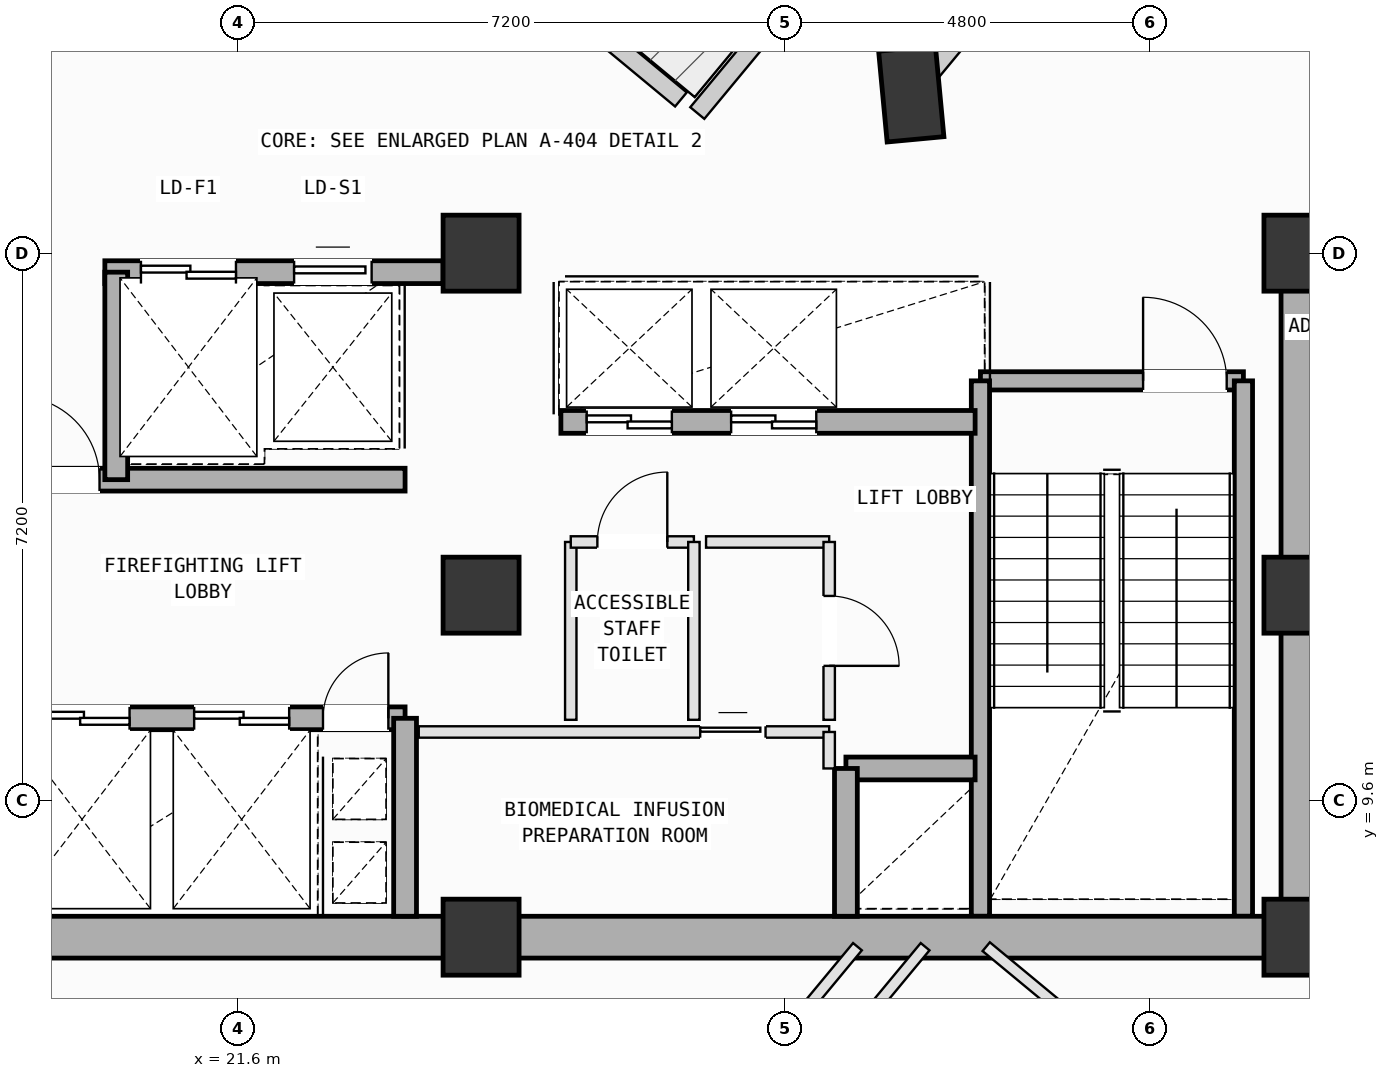
"""IFC4 building model, lengths in metres.
Left out: names, types, materials, properties, quantities, classifications, styles, units other than length and angle.
Written with IfcOpenShell. Run it as: python <this file> out.ifc"""

import sys

from ifc_helpers import new_model, si_unit, direction, frame, frame_2d, origin, origin_2d, place, context, subcontext, project, spatial, rectangle, extrude, element, fill, save


model = new_model("IFC4")
c1 = context("Model", 3, precision=1e-05, world=origin(), true_north=direction((0.0, 1.0)))
c2 = subcontext(c1, "Body", "Model", "MODEL_VIEW")
j1 = project(units=[si_unit("LENGTHUNIT", "METRE"), si_unit("PLANEANGLEUNIT", "RADIAN")], contexts=[c1])
p1 = place(None, origin())
s1 = spatial("IfcSite", under=j1, at=p1, CompositionType="ELEMENT")
p2 = place(p1, origin())
s2 = spatial("IfcBuilding", under=s1, at=p2, CompositionType="ELEMENT")
p3 = place(p2, frame((0.0, 0.0, 239.2)))
s3 = spatial("IfcBuildingStorey", under=s2, at=p3, CompositionType="ELEMENT", Elevation=239.2)
for number, where, z_axis, x_axis in (
    (1, (24.8, 7.8, 0.0), (0.0, 0.0, 1.0), (1.0, 0.0, 0.0)),
    (2, (24.8, 12.3, 0.0), (0.0, 0.0, 1.0), (1.0, 0.0, 0.0)),
    (3, (24.8, 16.8, 0.0), (0.0, 0.0, 1.0), (1.0, 0.0, 0.0)),
    (4, (35.6, 7.8, 0.0), (0.0, 0.0, 1.0), (1.0, 0.0, 0.0)),
    (5, (35.6, 12.3, 0.0), (0.0, 0.0, 1.0), (1.0, 0.0, 0.0)),
    (6, (35.6, 16.8, 0.0), (0.0, 0.0, 1.0), (1.0, 0.0, 0.0)),
):
    element("IfcColumn", number, at=place(p3, frame(where, z_axis=z_axis, x_axis=x_axis)), inside=s3, PredefinedType="COLUMN", context=c2, shape_type="SweptSolid", body=[
        extrude(rectangle(XDim=1.0, YDim=1.0, at=origin_2d()), origin(), (0.0, 0.0, 1.0), 4.0),
    ])
p4 = place(p3, frame((30.46, 18.895, 0.002), z_axis=(0.024549214527, -0.012763148846, 0.99961714576), x_axis=(-0.926059407811, 0.376370916509, 0.027548256063)))
e7 = element("IfcColumn", 7, at=p4, inside=s3, PredefinedType="COLUMN", context=c2, shape_type="SweptSolid", body=[
    extrude(rectangle(XDim=1.2, YDim=0.75, at=origin_2d()), origin(), (0.0, 0.0, 1.0), 3.998),
])
p5 = place(p3, frame((22.07, 23.264, 0.0), z_axis=(0.0, 0.0, 1.0), x_axis=(0.769955085711, -0.638098084928, 0.0)))
e8 = element("IfcWall", 8, at=p5, inside=s3, PredefinedType="SOLIDWALL", context=c2, shape_type="SweptSolid", body=[
    extrude(rectangle(XDim=6.96, YDim=0.24, at=frame_2d((3.48, 0.0))), origin(), (0.0, 0.0, 1.0), 3.265),
])
p6 = place(p5, frame((3.375, 0.0, 0.0)))
e9 = element("IfcOpeningElement", 9, at=p6, cuts=e8, PredefinedType="OPENING", context=c2, shape_type="SweptSolid", body=[
    extrude(rectangle(XDim=1.1, YDim=2.15, at=frame_2d((0.55, 1.075))), frame((0.0, 0.13, 0.0), z_axis=(0.0, -1.0, 0.0), x_axis=(1.0, 0.0, 0.0)), (0.0, 0.0, 1.0), 0.26),
])
p7 = place(p3, frame((27.645, 18.644, 0.0), z_axis=(0.0, 0.0, 1.0), x_axis=(0.638107200467, 0.769947531142, 0.0)))
e10 = element("IfcWall", 10, at=p7, inside=s3, PredefinedType="SOLIDWALL", context=c2, shape_type="SweptSolid", body=[
    extrude(rectangle(XDim=2.5, YDim=0.24, at=frame_2d((1.25, 0.0))), origin(), (0.0, 0.0, 1.0), 3.265),
])
p8 = place(p3, frame((30.719, 19.208, 0.0), z_axis=(0.0, 0.0, 1.0), x_axis=(0.638099795901, 0.769953667743, 0.0)))
e11 = element("IfcWall", 11, at=p8, inside=s3, PredefinedType="SOLIDWALL", context=c2, shape_type="SweptSolid", body=[
    extrude(rectangle(XDim=6.158, YDim=0.28, at=frame_2d((3.079, 0.0))), origin(), (0.0, 0.0, 1.0), 3.265),
])
p9 = place(p8, frame((3.468, 0.0, 0.75)))
e12 = element("IfcOpeningElement", 12, at=p9, cuts=e11, PredefinedType="OPENING", context=c2, shape_type="SweptSolid", body=[
    extrude(rectangle(XDim=1.8, YDim=2.05, at=frame_2d((0.9, 1.025))), frame((0.0, 0.15, 0.0), z_axis=(0.0, -1.0, 0.0), x_axis=(1.0, 0.0, 0.0)), (0.0, 0.0, 1.0), 0.3),
])
p10 = place(p3, frame((31.37, 15.12, 0.0), z_axis=(0.0, 0.0, 1.0), x_axis=(1.0, 0.0, 0.0)))
e13 = element("IfcWall", 13, at=p10, inside=s3, PredefinedType="SOLIDWALL", context=c2, shape_type="SweptSolid", body=[
    extrude(rectangle(XDim=3.46, YDim=0.24, at=frame_2d((1.73, 0.0))), origin(), (0.0, 0.0, 1.0), 3.78),
])
p11 = place(p10, frame((2.14, 0.0, 0.0)))
e14 = element("IfcOpeningElement", 14, at=p11, cuts=e13, PredefinedType="OPENING", context=c2, shape_type="SweptSolid", body=[
    extrude(rectangle(XDim=1.1, YDim=2.15, at=frame_2d((0.55, 1.075))), frame((0.0, 0.13, 0.0), z_axis=(0.0, -1.0, 0.0), x_axis=(1.0, 0.0, 0.0)), (0.0, 0.0, 1.0), 0.26),
])
for number, where, z_axis, x_axis in (
    (15, (34.83, 15.12, 0.0), (0.0, 0.0, 1.0), (0.0, -1.0, 0.0)),
    (16, (31.37, 8.075, 0.0), (0.0, 0.0, 1.0), (0.0, 1.0, 0.0)),
):
    element("IfcWall", number, at=place(p3, frame(where, z_axis=z_axis, x_axis=x_axis)), inside=s3, PredefinedType="SOLIDWALL", context=c2, shape_type="SweptSolid", body=[
        extrude(rectangle(XDim=7.045, YDim=0.24, at=frame_2d((3.522, 0.0))), origin(), (0.0, 0.0, 1.0), 3.78),
    ])
for number, where, z_axis, x_axis in (
    (17, (14.0, 7.8, 0.0), (0.0, 0.0, 1.0), (1.0, 0.0, 0.0)),
    (18, (24.8, 7.8, 0.0), (0.0, 0.0, 1.0), (1.0, 0.0, 0.0)),
):
    element("IfcWall", number, at=place(p3, frame(where, z_axis=z_axis, x_axis=x_axis)), inside=s3, PredefinedType="SHEAR", context=c2, shape_type="SweptSolid", body=[
        extrude(rectangle(XDim=10.8, YDim=0.55, at=frame_2d((5.4, 0.0))), origin(), (0.0, 0.0, 1.0), 3.78),
    ])
p12 = place(p3, frame((35.6, 7.8, 0.0), z_axis=(0.0, 0.0, 1.0), x_axis=(0.0, 1.0, 0.0)))
e19 = element("IfcWall", 19, at=p12, inside=s3, PredefinedType="SHEAR", context=c2, shape_type="SweptSolid", body=[
    extrude(rectangle(XDim=9.0, YDim=0.55, at=frame_2d((4.5, 0.0))), origin(), (0.0, 0.0, 1.0), 3.78),
])
p13 = place(p3, frame((19.85, 16.55, 0.0), z_axis=(0.0, 0.0, 1.0), x_axis=(1.0, 0.0, 0.0)))
e20 = element("IfcWall", 20, at=p13, inside=s3, PredefinedType="SOLIDWALL", context=c2, shape_type="SweptSolid", body=[
    extrude(rectangle(XDim=4.45, YDim=0.3, at=frame_2d((2.225, 0.0))), origin(), (0.0, 0.0, 1.0), 3.78),
])
p14 = place(p13, frame((0.475, 0.0, 0.0)))
e21 = element("IfcOpeningElement", 21, at=p14, cuts=e20, PredefinedType="OPENING", context=c2, shape_type="SweptSolid", body=[
    extrude(rectangle(XDim=1.25, YDim=2.18, at=frame_2d((0.625, 1.09))), frame((0.0, 0.16, 0.0), z_axis=(0.0, -1.0, 0.0), x_axis=(1.0, 0.0, 0.0)), (0.0, 0.0, 1.0), 0.32),
])
p15 = place(p13, frame((2.49, 0.0, 0.0)))
e22 = element("IfcOpeningElement", 22, at=p15, cuts=e20, PredefinedType="OPENING", context=c2, shape_type="SweptSolid", body=[
    extrude(rectangle(XDim=1.02, YDim=2.12, at=frame_2d((0.51, 1.06))), frame((0.0, 0.16, 0.0), z_axis=(0.0, -1.0, 0.0), x_axis=(1.0, 0.0, 0.0)), (0.0, 0.0, 1.0), 0.32),
])
p16 = place(p3, frame((18.5, 10.68, 0.0), z_axis=(0.0, 0.0, 1.0), x_axis=(1.0, 0.0, 0.0)))
e23 = element("IfcWall", 23, at=p16, inside=s3, PredefinedType="SOLIDWALL", context=c2, shape_type="SweptSolid", body=[
    extrude(rectangle(XDim=5.3, YDim=0.3, at=frame_2d((2.65, 0.0))), origin(), (0.0, 0.0, 1.0), 3.78),
])
p17 = place(p16, frame((4.22, 0.0, 0.0)))
e24 = element("IfcOpeningElement", 24, at=p17, cuts=e23, PredefinedType="OPENING", context=c2, shape_type="SweptSolid", body=[
    extrude(rectangle(XDim=0.86, YDim=2.06, at=frame_2d((0.43, 1.03))), frame((0.0, 0.16, 0.0), z_axis=(0.0, -1.0, 0.0), x_axis=(1.0, 0.0, 0.0)), (0.0, 0.0, 1.0), 0.32),
])
p18 = place(p16, frame((0.425, 0.0, 0.0)))
e25 = element("IfcOpeningElement", 25, at=p18, cuts=e23, PredefinedType="OPENING", context=c2, shape_type="SweptSolid", body=[
    extrude(rectangle(XDim=1.25, YDim=2.18, at=frame_2d((0.625, 1.09))), frame((0.0, 0.16, 0.0), z_axis=(0.0, -1.0, 0.0), x_axis=(1.0, 0.0, 0.0)), (0.0, 0.0, 1.0), 0.32),
])
p19 = place(p16, frame((2.525, 0.0, 0.0)))
e26 = element("IfcOpeningElement", 26, at=p19, cuts=e23, PredefinedType="OPENING", context=c2, shape_type="SweptSolid", body=[
    extrude(rectangle(XDim=1.25, YDim=2.18, at=frame_2d((0.625, 1.09))), frame((0.0, 0.16, 0.0), z_axis=(0.0, -1.0, 0.0), x_axis=(1.0, 0.0, 0.0)), (0.0, 0.0, 1.0), 0.32),
])
p20 = place(p3, frame((18.5, 13.82, 0.0), z_axis=(0.0, 0.0, 1.0), x_axis=(1.0, 0.0, 0.0)))
e27 = element("IfcWall", 27, at=p20, inside=s3, PredefinedType="SOLIDWALL", context=c2, shape_type="SweptSolid", body=[
    extrude(rectangle(XDim=5.3, YDim=0.3, at=frame_2d((2.65, 0.0))), origin(), (0.0, 0.0, 1.0), 3.78),
])
p21 = place(p20, frame((0.18, 0.0, 0.0)))
e28 = element("IfcOpeningElement", 28, at=p21, cuts=e27, PredefinedType="OPENING", context=c2, shape_type="SweptSolid", body=[
    extrude(rectangle(XDim=1.1, YDim=2.15, at=frame_2d((0.55, 1.075))), frame((0.0, 0.16, 0.0), z_axis=(0.0, -1.0, 0.0), x_axis=(1.0, 0.0, 0.0)), (0.0, 0.0, 1.0), 0.32),
])
p22 = place(p3, frame((23.8, 8.075, 0.0), z_axis=(0.0, 0.0, 1.0), x_axis=(0.0, 1.0, 0.0)))
e29 = element("IfcWall", 29, at=p22, inside=s3, PredefinedType="SOLIDWALL", context=c2, shape_type="SweptSolid", body=[
    extrude(rectangle(XDim=2.605, YDim=0.3, at=frame_2d((1.302, 0.0))), origin(), (0.0, 0.0, 1.0), 3.78),
])
p23 = place(p3, frame((20.0, 13.82, 0.0), z_axis=(0.0, 0.0, 1.0), x_axis=(0.0, 1.0, 0.0)))
e30 = element("IfcWall", 30, at=p23, inside=s3, PredefinedType="SOLIDWALL", context=c2, shape_type="SweptSolid", body=[
    extrude(rectangle(XDim=2.73, YDim=0.3, at=frame_2d((1.365, 0.0))), origin(), (0.0, 0.0, 1.0), 3.78),
])
p24 = place(p3, frame((29.6, 10.02, 0.0), z_axis=(0.0, 0.0, 1.0), x_axis=(1.0, 0.0, 0.0)))
e31 = element("IfcWall", 31, at=p24, inside=s3, PredefinedType="SOLIDWALL", context=c2, shape_type="SweptSolid", body=[
    extrude(rectangle(XDim=1.7, YDim=0.3, at=frame_2d((0.85, 0.0))), origin(), (0.0, 0.0, 1.0), 3.78),
])
p25 = place(p3, frame((29.6, 8.075, 0.0), z_axis=(0.0, 0.0, 1.0), x_axis=(0.0, 1.0, 0.0)))
e32 = element("IfcWall", 32, at=p25, inside=s3, PredefinedType="SOLIDWALL", context=c2, shape_type="SweptSolid", body=[
    extrude(rectangle(XDim=1.945, YDim=0.3, at=frame_2d((0.973, 0.0))), origin(), (0.0, 0.0, 1.0), 3.78),
])
p26 = place(p3, frame((25.85, 14.58, 0.0), z_axis=(0.0, 0.0, 1.0), x_axis=(1.0, 0.0, 0.0)))
e33 = element("IfcWall", 33, at=p26, inside=s3, PredefinedType="SOLIDWALL", context=c2, shape_type="SweptSolid", body=[
    extrude(rectangle(XDim=5.45, YDim=0.3, at=frame_2d((2.725, 0.0))), origin(), (0.0, 0.0, 1.0), 3.78),
])
p27 = place(p26, frame((0.34, 0.0, 0.0)))
e34 = element("IfcOpeningElement", 34, at=p27, cuts=e33, PredefinedType="OPENING", context=c2, shape_type="SweptSolid", body=[
    extrude(rectangle(XDim=1.12, YDim=2.15, at=frame_2d((0.56, 1.075))), frame((0.0, 0.16, 0.0), z_axis=(0.0, -1.0, 0.0), x_axis=(1.0, 0.0, 0.0)), (0.0, 0.0, 1.0), 0.32),
])
p28 = place(p26, frame((2.24, 0.0, 0.0)))
e35 = element("IfcOpeningElement", 35, at=p28, cuts=e33, PredefinedType="OPENING", context=c2, shape_type="SweptSolid", body=[
    extrude(rectangle(XDim=1.12, YDim=2.15, at=frame_2d((0.56, 1.075))), frame((0.0, 0.16, 0.0), z_axis=(0.0, -1.0, 0.0), x_axis=(1.0, 0.0, 0.0)), (0.0, 0.0, 1.0), 0.32),
])
p29 = place(p3, frame((23.98, 10.5, 0.0), z_axis=(0.0, 0.0, 1.0), x_axis=(1.0, 0.0, 0.0)))
e36 = element("IfcWall", 36, at=p29, inside=s3, PredefinedType="PARTITIONING", context=c2, shape_type="SweptSolid", body=[
    extrude(rectangle(XDim=5.4, YDim=0.15, at=frame_2d((2.7, 0.0))), origin(), (0.0, 0.0, 1.0), 3.78),
])
p30 = place(p29, frame((3.703, 0.0, 0.0)))
e37 = element("IfcOpeningElement", 37, at=p30, cuts=e36, PredefinedType="OPENING", context=c2, shape_type="SweptSolid", body=[
    extrude(rectangle(XDim=0.86, YDim=2.06, at=frame_2d((0.43, 1.03))), frame((0.0, 0.085, 0.0), z_axis=(0.0, -1.0, 0.0), x_axis=(1.0, 0.0, 0.0)), (0.0, 0.0, 1.0), 0.17),
])
p31 = place(p3, frame((29.38, 10.5, 0.0), z_axis=(0.0, 0.0, 1.0), x_axis=(0.0, -1.0, 0.0)))
e38 = element("IfcWall", 38, at=p31, inside=s3, PredefinedType="PARTITIONING", context=c2, shape_type="SweptSolid", body=[
    extrude(rectangle(XDim=0.48, YDim=0.15, at=frame_2d((0.24, 0.0))), origin(), (0.0, 0.0, 1.0), 3.78),
])
p32 = place(p3, frame((25.98, 10.66, 0.0), z_axis=(0.0, 0.0, 1.0), x_axis=(0.0, 1.0, 0.0)))
e39 = element("IfcWall", 39, at=p32, inside=s3, PredefinedType="PARTITIONING", context=c2, shape_type="SweptSolid", body=[
    extrude(rectangle(XDim=2.34, YDim=0.15, at=frame_2d((1.17, 0.0))), origin(), (0.0, 0.0, 1.0), 3.78),
])
p33 = place(p3, frame((25.98, 13.0, 0.0), z_axis=(0.0, 0.0, 1.0), x_axis=(1.0, 0.0, 0.0)))
e40 = element("IfcWall", 40, at=p33, inside=s3, PredefinedType="PARTITIONING", context=c2, shape_type="SweptSolid", body=[
    extrude(rectangle(XDim=1.62, YDim=0.15, at=frame_2d((0.81, 0.0))), origin(), (0.0, 0.0, 1.0), 3.78),
])
p34 = place(p33, frame((0.35, 0.0, 0.0)))
e41 = element("IfcOpeningElement", 41, at=p34, cuts=e40, PredefinedType="OPENING", context=c2, shape_type="SweptSolid", body=[
    extrude(rectangle(XDim=0.92, YDim=2.1, at=frame_2d((0.46, 1.05))), frame((0.0, 0.085, 0.0), z_axis=(0.0, -1.0, 0.0), x_axis=(1.0, 0.0, 0.0)), (0.0, 0.0, 1.0), 0.17),
])
p35 = place(p3, frame((27.6, 13.0, 0.0), z_axis=(0.0, 0.0, 1.0), x_axis=(0.0, -1.0, 0.0)))
e42 = element("IfcWall", 42, at=p35, inside=s3, PredefinedType="PARTITIONING", context=c2, shape_type="SweptSolid", body=[
    extrude(rectangle(XDim=2.34, YDim=0.15, at=frame_2d((1.17, 0.0))), origin(), (0.0, 0.0, 1.0), 3.78),
])
p36 = place(p3, frame((27.76, 13.0, 0.0), z_axis=(0.0, 0.0, 1.0), x_axis=(1.0, 0.0, 0.0)))
e43 = element("IfcWall", 43, at=p36, inside=s3, PredefinedType="PARTITIONING", context=c2, shape_type="SweptSolid", body=[
    extrude(rectangle(XDim=1.62, YDim=0.15, at=frame_2d((0.81, 0.0))), origin(), (0.0, 0.0, 1.0), 3.78),
])
p37 = place(p3, frame((29.38, 13.0, 0.0), z_axis=(0.0, 0.0, 1.0), x_axis=(0.0, -1.0, 0.0)))
e44 = element("IfcWall", 44, at=p37, inside=s3, PredefinedType="PARTITIONING", context=c2, shape_type="SweptSolid", body=[
    extrude(rectangle(XDim=2.34, YDim=0.15, at=frame_2d((1.17, 0.0))), origin(), (0.0, 0.0, 1.0), 3.78),
])
p38 = place(p37, frame((0.71, 0.0, 0.0)))
e45 = element("IfcOpeningElement", 45, at=p38, cuts=e44, PredefinedType="OPENING", context=c2, shape_type="SweptSolid", body=[
    extrude(rectangle(XDim=0.92, YDim=2.1, at=frame_2d((0.46, 1.05))), frame((0.0, 0.085, 0.0), z_axis=(0.0, -1.0, 0.0), x_axis=(1.0, 0.0, 0.0)), (0.0, 0.0, 1.0), 0.17),
])
p39 = place(p3, frame((22.818, -1.766, 0.0), z_axis=(0.0, 0.0, 1.0), x_axis=(0.638080601812, 0.769969574458, 0.0)))
e46 = element("IfcWall", 46, at=p39, inside=s3, PredefinedType="PARTITIONING", context=c2, shape_type="SweptSolid", body=[
    extrude(rectangle(XDim=12.262, YDim=0.15, at=frame_2d((6.131, 0.0))), origin(), (0.0, 0.0, 1.0), 3.78),
])
p40 = place(p3, frame((31.446, 7.675, 0.0), z_axis=(0.0, 0.0, 1.0), x_axis=(0.769940315386, -0.638115906982, 0.0)))
e47 = element("IfcWall", 47, at=p40, inside=s3, PredefinedType="PARTITIONING", context=c2, shape_type="SweptSolid", body=[
    extrude(rectangle(XDim=12.866, YDim=0.15, at=frame_2d((6.433, 0.0))), origin(), (0.0, 0.0, 1.0), 3.78),
])
p41 = place(p40, frame((6.256, 0.0, 0.0)))
e48 = element("IfcOpeningElement", 48, at=p41, cuts=e47, PredefinedType="OPENING", context=c2, shape_type="SweptSolid", body=[
    extrude(rectangle(XDim=0.86, YDim=2.06, at=frame_2d((0.43, 1.03))), frame((0.0, 0.085, 0.0), z_axis=(0.0, -1.0, 0.0), x_axis=(1.0, 0.0, 0.0)), (0.0, 0.0, 1.0), 0.17),
])
p42 = place(p3, frame((35.6, 7.5, 0.0), z_axis=(0.0, 0.0, 1.0), x_axis=(1.0, 0.0, 0.0)))
e49 = element("IfcWall", 49, at=p42, inside=s3, PredefinedType="PARTITIONING", context=c2, shape_type="SweptSolid", body=[
    extrude(rectangle(XDim=0.55, YDim=0.15, at=frame_2d((0.275, 0.0))), origin(), (0.0, 0.0, 1.0), 3.78),
])
p43 = place(p3, frame((29.752, 7.675, 0.0), z_axis=(0.0, 0.0, 1.0), x_axis=(-0.63808541453, -0.769965586091, 0.0)))
e50 = element("IfcWall", 50, at=p43, inside=s3, PredefinedType="PARTITIONING", context=c2, shape_type="SweptSolid", body=[
    extrude(rectangle(XDim=11.694, YDim=0.15, at=frame_2d((5.847, 0.0))), origin(), (0.0, 0.0, 1.0), 3.78),
])
p44 = place(p11, origin())
e51 = element("IfcDoor", 51, at=p44, inside=s3, OperationType="SINGLE_SWING_LEFT", PredefinedType="DOOR", context=c2, shape_type="SweptSolid", body=[
    extrude(rectangle(XDim=1.1, YDim=2.15, at=frame_2d((0.55, 1.075))), frame((0.0, 0.025, 0.0), z_axis=(0.0, -1.0, 0.0), x_axis=(1.0, 0.0, 0.0)), (0.0, 0.0, 1.0), 0.05),
])
fill(e14, e51)
p45 = place(p17, origin())
e52 = element("IfcDoor", 52, at=p45, inside=s3, OperationType="SINGLE_SWING_RIGHT", PredefinedType="DOOR", context=c2, shape_type="SweptSolid", body=[
    extrude(rectangle(XDim=0.86, YDim=2.06, at=frame_2d((0.43, 1.03))), frame((0.0, 0.025, 0.0), z_axis=(0.0, -1.0, 0.0), x_axis=(1.0, 0.0, 0.0)), (0.0, 0.0, 1.0), 0.05),
])
fill(e24, e52)
p46 = place(p21, origin())
e53 = element("IfcDoor", 53, at=p46, inside=s3, OperationType="SINGLE_SWING_LEFT", PredefinedType="DOOR", context=c2, shape_type="SweptSolid", body=[
    extrude(rectangle(XDim=1.1, YDim=2.15, at=frame_2d((0.55, 1.075))), frame((0.0, 0.025, 0.0), z_axis=(0.0, -1.0, 0.0), x_axis=(1.0, 0.0, 0.0)), (0.0, 0.0, 1.0), 0.05),
])
fill(e28, e53)
p47 = place(p18, origin())
e54 = element("IfcDoor", 54, at=p47, inside=s3, OperationType="DOUBLE_DOOR_SLIDING", PredefinedType="DOOR", context=c2, shape_type="SweptSolid", body=[
    extrude(rectangle(XDim=1.25, YDim=2.18, at=frame_2d((0.625, 1.09))), frame((0.0, 0.025, 0.0), z_axis=(0.0, -1.0, 0.0), x_axis=(1.0, 0.0, 0.0)), (0.0, 0.0, 1.0), 0.05),
])
fill(e25, e54)
p48 = place(p19, origin())
e55 = element("IfcDoor", 55, at=p48, inside=s3, OperationType="DOUBLE_DOOR_SLIDING", PredefinedType="DOOR", context=c2, shape_type="SweptSolid", body=[
    extrude(rectangle(XDim=1.25, YDim=2.18, at=frame_2d((0.625, 1.09))), frame((0.0, 0.025, 0.0), z_axis=(0.0, -1.0, 0.0), x_axis=(1.0, 0.0, 0.0)), (0.0, 0.0, 1.0), 0.05),
])
fill(e26, e55)
p49 = place(p27, origin())
e56 = element("IfcDoor", 56, at=p49, inside=s3, OperationType="DOUBLE_DOOR_SLIDING", PredefinedType="DOOR", context=c2, shape_type="SweptSolid", body=[
    extrude(rectangle(XDim=1.12, YDim=2.15, at=frame_2d((0.56, 1.075))), frame((0.0, 0.025, 0.0), z_axis=(0.0, -1.0, 0.0), x_axis=(1.0, 0.0, 0.0)), (0.0, 0.0, 1.0), 0.05),
])
fill(e34, e56)
p50 = place(p28, origin())
e57 = element("IfcDoor", 57, at=p50, inside=s3, OperationType="DOUBLE_DOOR_SLIDING", PredefinedType="DOOR", context=c2, shape_type="SweptSolid", body=[
    extrude(rectangle(XDim=1.12, YDim=2.15, at=frame_2d((0.56, 1.075))), frame((0.0, 0.025, 0.0), z_axis=(0.0, -1.0, 0.0), x_axis=(1.0, 0.0, 0.0)), (0.0, 0.0, 1.0), 0.05),
])
fill(e35, e57)
p51 = place(p14, origin())
e58 = element("IfcDoor", 58, at=p51, inside=s3, OperationType="DOUBLE_DOOR_SLIDING", PredefinedType="DOOR", context=c2, shape_type="SweptSolid", body=[
    extrude(rectangle(XDim=1.25, YDim=2.18, at=frame_2d((0.625, 1.09))), frame((0.0, 0.025, 0.0), z_axis=(0.0, -1.0, 0.0), x_axis=(1.0, 0.0, 0.0)), (0.0, 0.0, 1.0), 0.05),
])
fill(e21, e58)
p52 = place(p15, origin())
e59 = element("IfcDoor", 59, at=p52, inside=s3, OperationType="SLIDING_TO_LEFT", PredefinedType="DOOR", context=c2, shape_type="SweptSolid", body=[
    extrude(rectangle(XDim=1.02, YDim=2.12, at=frame_2d((0.51, 1.06))), frame((0.0, 0.025, 0.0), z_axis=(0.0, -1.0, 0.0), x_axis=(1.0, 0.0, 0.0)), (0.0, 0.0, 1.0), 0.05),
])
fill(e22, e59)
p53 = place(p34, origin())
e60 = element("IfcDoor", 60, at=p53, inside=s3, OperationType="SINGLE_SWING_RIGHT", PredefinedType="DOOR", context=c2, shape_type="SweptSolid", body=[
    extrude(rectangle(XDim=0.92, YDim=2.1, at=frame_2d((0.46, 1.05))), frame((0.0, 0.025, 0.0), z_axis=(0.0, -1.0, 0.0), x_axis=(1.0, 0.0, 0.0)), (0.0, 0.0, 1.0), 0.05),
])
fill(e41, e60)
p54 = place(p38, origin())
e61 = element("IfcDoor", 61, at=p54, inside=s3, OperationType="SINGLE_SWING_RIGHT", PredefinedType="DOOR", context=c2, shape_type="SweptSolid", body=[
    extrude(rectangle(XDim=0.92, YDim=2.1, at=frame_2d((0.46, 1.05))), frame((0.0, 0.025, 0.0), z_axis=(0.0, -1.0, 0.0), x_axis=(1.0, 0.0, 0.0)), (0.0, 0.0, 1.0), 0.05),
])
fill(e45, e61)
p55 = place(p30, origin())
e62 = element("IfcDoor", 62, at=p55, inside=s3, OperationType="SLIDING_TO_LEFT", PredefinedType="DOOR", context=c2, shape_type="SweptSolid", body=[
    extrude(rectangle(XDim=0.86, YDim=2.06, at=frame_2d((0.43, 1.03))), frame((0.0, 0.025, 0.0), z_axis=(0.0, -1.0, 0.0), x_axis=(1.0, 0.0, 0.0)), (0.0, 0.0, 1.0), 0.05),
])
fill(e37, e62)
save(model, sys.argv[1])
